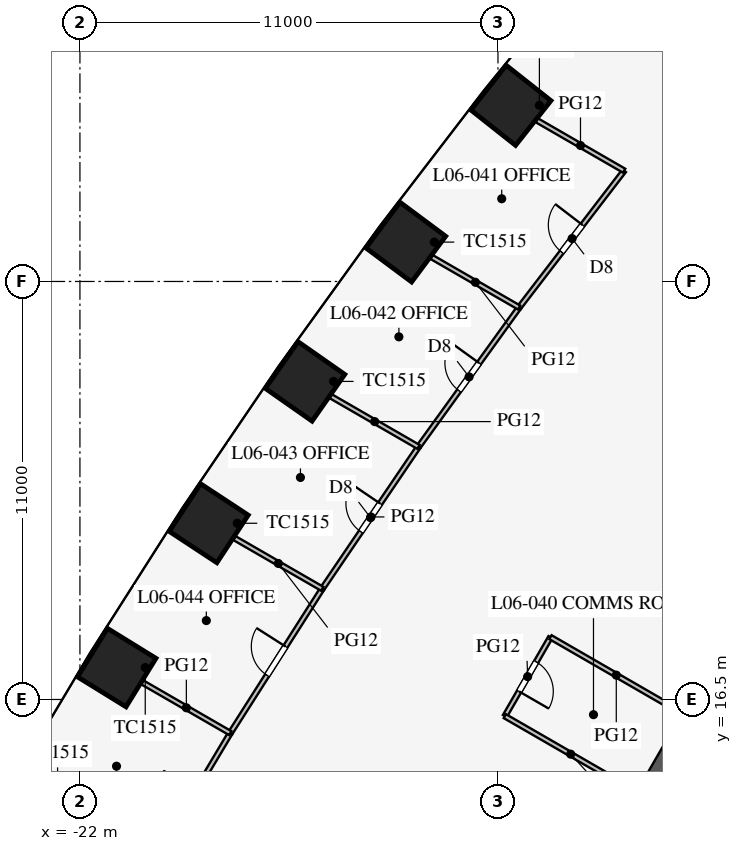
"""IFC4 building model, lengths in metres.
Left out: names, types, materials, properties, quantities, classifications, styles, units other than length and angle.
Written with IfcOpenShell. Run it as: python <this file> out.ifc"""

import sys

from ifc_helpers import new_model, si_unit, direction, frame, frame_2d, origin, origin_2d, place, context, subcontext, project, spatial, rectangle, extrude, element, fill, save


model = new_model("IFC4")
c1 = context("Model", 3, precision=1e-05, world=origin(), true_north=direction((0.0, 1.0)))
c2 = subcontext(c1, "Body", "Model", "MODEL_VIEW")
j1 = project(units=[si_unit("LENGTHUNIT", "METRE"), si_unit("PLANEANGLEUNIT", "RADIAN")], contexts=[c1])
p1 = place(None, origin())
s1 = spatial("IfcSite", under=j1, at=p1, CompositionType="ELEMENT")
p2 = place(p1, origin())
s2 = spatial("IfcBuilding", under=s1, at=p2, CompositionType="ELEMENT")
p3 = place(p2, frame((0.0, 0.0, 29.1)))
s3 = spatial("IfcBuildingStorey", under=s2, at=p3, CompositionType="ELEMENT", Elevation=29.1)
for number, where, z_axis, x_axis in (
    (1, (-10.66, 32.135, 0.0), (0.0, 0.0, 1.0), (-0.62, -0.784, 0.0)),
    (2, (-13.426, 28.536, 0.0), (0.0, 0.0, 1.0), (-0.597, -0.802, 0.0)),
    (3, (-16.076, 24.87, 0.0), (0.0, 0.0, 1.0), (-0.574, -0.819, 0.0)),
    (4, (-18.611, 21.137, 0.0), (0.0, 0.0, 1.0), (-0.549, -0.836, 0.0)),
    (5, (-21.031, 17.339, 0.0), (0.0, 0.0, 1.0), (-0.525, -0.851, 0.0)),
):
    element("IfcColumn", number, at=place(p3, frame(where, z_axis=z_axis, x_axis=x_axis)), inside=s3, PredefinedType="COLUMN", context=c2, shape_type="SweptSolid", body=[
        extrude(rectangle(XDim=1.5, YDim=1.5, at=origin_2d()), origin(), (0.0, 0.0, 1.0), 4.2),
    ])
p4 = place(p3, frame((-5.773, 16.0, 0.0), z_axis=(0.0, 0.0, 1.0), x_axis=(-0.500002442456, -0.866023993627, 0.0)))
e6 = element("IfcWall", 6, at=p4, inside=s3, PredefinedType="SHEAR", context=c2, shape_type="SweptSolid", body=[
    extrude(rectangle(XDim=21.939, YDim=0.8, at=frame_2d((10.97, 0.0))), origin(), (0.0, 0.0, 1.0), 4.2),
])
p5 = place(p4, frame((17.27, 0.0, 0.0)))
e7 = element("IfcOpeningElement", 7, at=p5, cuts=e6, PredefinedType="OPENING", context=c2, shape_type="SweptSolid", body=[
    extrude(rectangle(XDim=1.2, YDim=2.1, at=frame_2d((0.6, 1.05))), frame((0.0, 0.41, 0.0), z_axis=(0.0, -1.0, 0.0), x_axis=(1.0, 0.0, 0.0)), (0.0, 0.0, 1.0), 0.82),
])
p6 = place(p4, frame((3.47, 0.0, 0.0)))
e8 = element("IfcOpeningElement", 8, at=p6, cuts=e6, PredefinedType="OPENING", context=c2, shape_type="SweptSolid", body=[
    extrude(rectangle(XDim=1.2, YDim=2.1, at=frame_2d((0.6, 1.05))), frame((0.0, 0.41, 0.0), z_axis=(0.0, -1.0, 0.0), x_axis=(1.0, 0.0, 0.0)), (0.0, 0.0, 1.0), 0.82),
])
p7 = place(p3, frame((-9.619, 18.14, 0.0), z_axis=(0.0, 0.0, 1.0), x_axis=(-0.500001309137, -0.866024647952, 0.0)))
e9 = element("IfcWall", 9, at=p7, inside=s3, PredefinedType="PARTITIONING", context=c2, shape_type="SweptSolid", body=[
    extrude(rectangle(XDim=2.4, YDim=0.12, at=frame_2d((1.2, 0.0))), origin(), (0.0, 0.0, 1.0), 2.9),
])
p8 = place(p7, frame((0.75, 0.0, 0.15)))
e10 = element("IfcOpeningElement", 10, at=p8, cuts=e9, PredefinedType="OPENING", context=c2, shape_type="SweptSolid", body=[
    extrude(rectangle(XDim=0.9, YDim=2.1, at=frame_2d((0.45, 1.05))), frame((0.0, 0.07, 0.0), z_axis=(0.0, -1.0, 0.0), x_axis=(1.0, 0.0, 0.0)), (0.0, 0.0, 1.0), 0.14),
])
for number, where, z_axis, x_axis in (
    (11, (-6.155, 16.14, 0.0), (0.0, 0.0, 1.0), (-0.866, 0.5, 0.0)),
    (12, (-7.355, 14.061, 0.0), (0.0, 0.0, 1.0), (-0.866, 0.5, 0.0)),
):
    element("IfcWall", number, at=place(p3, frame(where, z_axis=z_axis, x_axis=x_axis)), inside=s3, PredefinedType="PARTITIONING", context=c2, shape_type="SweptSolid", body=[
        extrude(rectangle(XDim=4.0, YDim=0.12, at=frame_2d((2.0, 0.0))), origin(), (0.0, 0.0, 1.0), 2.9),
    ])
p9 = place(p3, frame((-13.091, 23.146, 0.0), z_axis=(0.0, 0.0, 1.0), x_axis=(-0.561512004239, -0.827468591002, 0.0)))
e13 = element("IfcWall", 13, at=p9, inside=s3, PredefinedType="PARTITIONING", context=c2, shape_type="SweptSolid", body=[
    extrude(rectangle(XDim=4.512, YDim=0.12, at=frame_2d((2.256, 0.0))), origin(), (0.0, 0.0, 1.0), 2.9),
])
p10 = place(p9, frame((1.8, 0.0, 0.15)))
e14 = element("IfcOpeningElement", 14, at=p10, cuts=e13, PredefinedType="OPENING", context=c2, shape_type="SweptSolid", body=[
    extrude(rectangle(XDim=0.9, YDim=2.1, at=frame_2d((0.45, 1.05))), frame((0.0, 0.07, 0.0), z_axis=(0.0, -1.0, 0.0), x_axis=(1.0, 0.0, 0.0)), (0.0, 0.0, 1.0), 0.14),
])
p11 = place(p3, frame((-10.443, 26.814, 0.0), z_axis=(0.0, 0.0, 1.0), x_axis=(-0.58534077607, -0.810787380187, 0.0)))
e15 = element("IfcWall", 15, at=p11, inside=s3, PredefinedType="PARTITIONING", context=c2, shape_type="SweptSolid", body=[
    extrude(rectangle(XDim=4.523, YDim=0.12, at=frame_2d((2.262, 0.0))), origin(), (0.0, 0.0, 1.0), 2.9),
])
p12 = place(p11, frame((1.8, 0.0, 0.15)))
e16 = element("IfcOpeningElement", 16, at=p12, cuts=e15, PredefinedType="OPENING", context=c2, shape_type="SweptSolid", body=[
    extrude(rectangle(XDim=0.9, YDim=2.1, at=frame_2d((0.45, 1.05))), frame((0.0, 0.07, 0.0), z_axis=(0.0, -1.0, 0.0), x_axis=(1.0, 0.0, 0.0)), (0.0, 0.0, 1.0), 0.14),
])
p13 = place(p3, frame((-7.679, 30.415, 0.0), z_axis=(0.0, 0.0, 1.0), x_axis=(-0.608818785139, -0.79330932609, 0.0)))
e17 = element("IfcWall", 17, at=p13, inside=s3, PredefinedType="PARTITIONING", context=c2, shape_type="SweptSolid", body=[
    extrude(rectangle(XDim=4.539, YDim=0.12, at=frame_2d((2.27, 0.0))), origin(), (0.0, 0.0, 1.0), 2.9),
])
p14 = place(p13, frame((1.8, 0.0, 0.15)))
e18 = element("IfcOpeningElement", 18, at=p14, cuts=e17, PredefinedType="OPENING", context=c2, shape_type="SweptSolid", body=[
    extrude(rectangle(XDim=0.9, YDim=2.1, at=frame_2d((0.45, 1.05))), frame((0.0, 0.07, 0.0), z_axis=(0.0, -1.0, 0.0), x_axis=(1.0, 0.0, 0.0)), (0.0, 0.0, 1.0), 0.14),
])
p15 = place(p3, frame((-18.044, 15.614, 0.0), z_axis=(0.0, 0.0, 1.0), x_axis=(-0.51252396108, -0.858672923364, 0.0)))
e19 = element("IfcWall", 19, at=p15, inside=s3, PredefinedType="PARTITIONING", context=c2, shape_type="SweptSolid", body=[
    extrude(rectangle(XDim=4.5, YDim=0.12, at=frame_2d((2.25, 0.0))), origin(), (0.0, 0.0, 1.0), 2.9),
])
p16 = place(p15, frame((1.75, 0.0, 0.15)))
e20 = element("IfcOpeningElement", 20, at=p16, cuts=e19, PredefinedType="OPENING", context=c2, shape_type="SweptSolid", body=[
    extrude(rectangle(XDim=1.0, YDim=2.1, at=frame_2d((0.5, 1.05))), frame((0.0, 0.07, 0.0), z_axis=(0.0, -1.0, 0.0), x_axis=(1.0, 0.0, 0.0)), (0.0, 0.0, 1.0), 0.14),
])
p17 = place(p3, frame((-15.624, 19.413, 0.0), z_axis=(0.0, 0.0, 1.0), x_axis=(-0.537243691336, -0.843427066272, 0.0)))
e21 = element("IfcWall", 21, at=p17, inside=s3, PredefinedType="PARTITIONING", context=c2, shape_type="SweptSolid", body=[
    extrude(rectangle(XDim=4.504, YDim=0.12, at=frame_2d((2.252, 0.0))), origin(), (0.0, 0.0, 1.0), 2.9),
])
p18 = place(p17, frame((1.8, 0.0, 0.15)))
e22 = element("IfcOpeningElement", 22, at=p18, cuts=e21, PredefinedType="OPENING", context=c2, shape_type="SweptSolid", body=[
    extrude(rectangle(XDim=0.9, YDim=2.1, at=frame_2d((0.45, 1.05))), frame((0.0, 0.07, 0.0), z_axis=(0.0, -1.0, 0.0), x_axis=(1.0, 0.0, 0.0)), (0.0, 0.0, 1.0), 0.14),
])
p19 = place(p3, frame((-13.091, 23.146, 0.0), z_axis=(0.0, 0.0, 1.0), x_axis=(-0.866023818221, 0.500002746266, 0.0)))
e23 = element("IfcWall", 23, at=p19, inside=s3, PredefinedType="PARTITIONING", context=c2, shape_type="SweptSolid", body=[
    extrude(rectangle(XDim=2.664, YDim=0.12, at=frame_2d((1.332, 0.0))), origin(), (0.0, 0.0, 1.0), 2.9),
])
p20 = place(p3, frame((-10.443, 26.814, 0.0), z_axis=(0.0, 0.0, 1.0), x_axis=(-0.866031171652, 0.499990009627, 0.0)))
e24 = element("IfcWall", 24, at=p20, inside=s3, PredefinedType="PARTITIONING", context=c2, shape_type="SweptSolid", body=[
    extrude(rectangle(XDim=2.659, YDim=0.12, at=frame_2d((1.33, 0.0))), origin(), (0.0, 0.0, 1.0), 2.9),
])
p21 = place(p3, frame((-7.679, 30.415, 0.0), z_axis=(0.0, 0.0, 1.0), x_axis=(-0.866026229868, 0.499998569178, 0.0)))
e25 = element("IfcWall", 25, at=p21, inside=s3, PredefinedType="PARTITIONING", context=c2, shape_type="SweptSolid", body=[
    extrude(rectangle(XDim=2.653, YDim=0.12, at=frame_2d((1.327, 0.0))), origin(), (0.0, 0.0, 1.0), 2.9),
])
p22 = place(p3, frame((-18.044, 15.614, 0.0), z_axis=(0.0, 0.0, 1.0), x_axis=(-0.866022619654, 0.500004822225, 0.0)))
e26 = element("IfcWall", 26, at=p22, inside=s3, PredefinedType="PARTITIONING", context=c2, shape_type="SweptSolid", body=[
    extrude(rectangle(XDim=2.669, YDim=0.12, at=frame_2d((1.335, 0.0))), origin(), (0.0, 0.0, 1.0), 2.9),
])
p23 = place(p3, frame((-15.624, 19.413, 0.0), z_axis=(0.0, 0.0, 1.0), x_axis=(-0.866020974757, 0.500007671222, 0.0)))
e27 = element("IfcWall", 27, at=p23, inside=s3, PredefinedType="PARTITIONING", context=c2, shape_type="SweptSolid", body=[
    extrude(rectangle(XDim=2.667, YDim=0.12, at=frame_2d((1.334, 0.0))), origin(), (0.0, 0.0, 1.0), 2.9),
])
p24 = place(p8, origin())
e28 = element("IfcDoor", 28, at=p24, inside=s3, OperationType="SINGLE_SWING_RIGHT", PredefinedType="DOOR", context=c2, shape_type="SweptSolid", body=[
    extrude(rectangle(XDim=0.9, YDim=2.1, at=frame_2d((0.45, 1.05))), frame((0.0, 0.025, 0.0), z_axis=(0.0, -1.0, 0.0), x_axis=(1.0, 0.0, 0.0)), (0.0, 0.0, 1.0), 0.05),
])
fill(e10, e28)
p25 = place(p14, frame((0.9, 0.0, 0.0), z_axis=(0.0, 0.0, 1.0), x_axis=(-1.0, 0.0, 0.0)))
e29 = element("IfcDoor", 29, at=p25, inside=s3, OperationType="SINGLE_SWING_RIGHT", PredefinedType="DOOR", context=c2, shape_type="SweptSolid", body=[
    extrude(rectangle(XDim=0.9, YDim=2.1, at=frame_2d((0.45, 1.05))), frame((0.0, 0.025, 0.0), z_axis=(0.0, -1.0, 0.0), x_axis=(1.0, 0.0, 0.0)), (0.0, 0.0, 1.0), 0.05),
])
fill(e18, e29)
p26 = place(p12, frame((0.9, 0.0, 0.0), z_axis=(0.0, 0.0, 1.0), x_axis=(-1.0, 0.0, 0.0)))
e30 = element("IfcDoor", 30, at=p26, inside=s3, OperationType="SINGLE_SWING_RIGHT", PredefinedType="DOOR", context=c2, shape_type="SweptSolid", body=[
    extrude(rectangle(XDim=0.9, YDim=2.1, at=frame_2d((0.45, 1.05))), frame((0.0, 0.025, 0.0), z_axis=(0.0, -1.0, 0.0), x_axis=(1.0, 0.0, 0.0)), (0.0, 0.0, 1.0), 0.05),
])
fill(e16, e30)
p27 = place(p10, frame((0.9, 0.0, 0.0), z_axis=(0.0, 0.0, 1.0), x_axis=(-1.0, 0.0, 0.0)))
e31 = element("IfcDoor", 31, at=p27, inside=s3, OperationType="SINGLE_SWING_RIGHT", PredefinedType="DOOR", context=c2, shape_type="SweptSolid", body=[
    extrude(rectangle(XDim=0.9, YDim=2.1, at=frame_2d((0.45, 1.05))), frame((0.0, 0.025, 0.0), z_axis=(0.0, -1.0, 0.0), x_axis=(1.0, 0.0, 0.0)), (0.0, 0.0, 1.0), 0.05),
])
fill(e14, e31)
p28 = place(p18, frame((0.9, 0.0, 0.0), z_axis=(0.0, 0.0, 1.0), x_axis=(-1.0, 0.0, 0.0)))
e32 = element("IfcDoor", 32, at=p28, inside=s3, OperationType="SINGLE_SWING_RIGHT", PredefinedType="DOOR", context=c2, shape_type="SweptSolid", body=[
    extrude(rectangle(XDim=0.9, YDim=2.1, at=frame_2d((0.45, 1.05))), frame((0.0, 0.025, 0.0), z_axis=(0.0, -1.0, 0.0), x_axis=(1.0, 0.0, 0.0)), (0.0, 0.0, 1.0), 0.05),
])
fill(e22, e32)
save(model, sys.argv[1])
